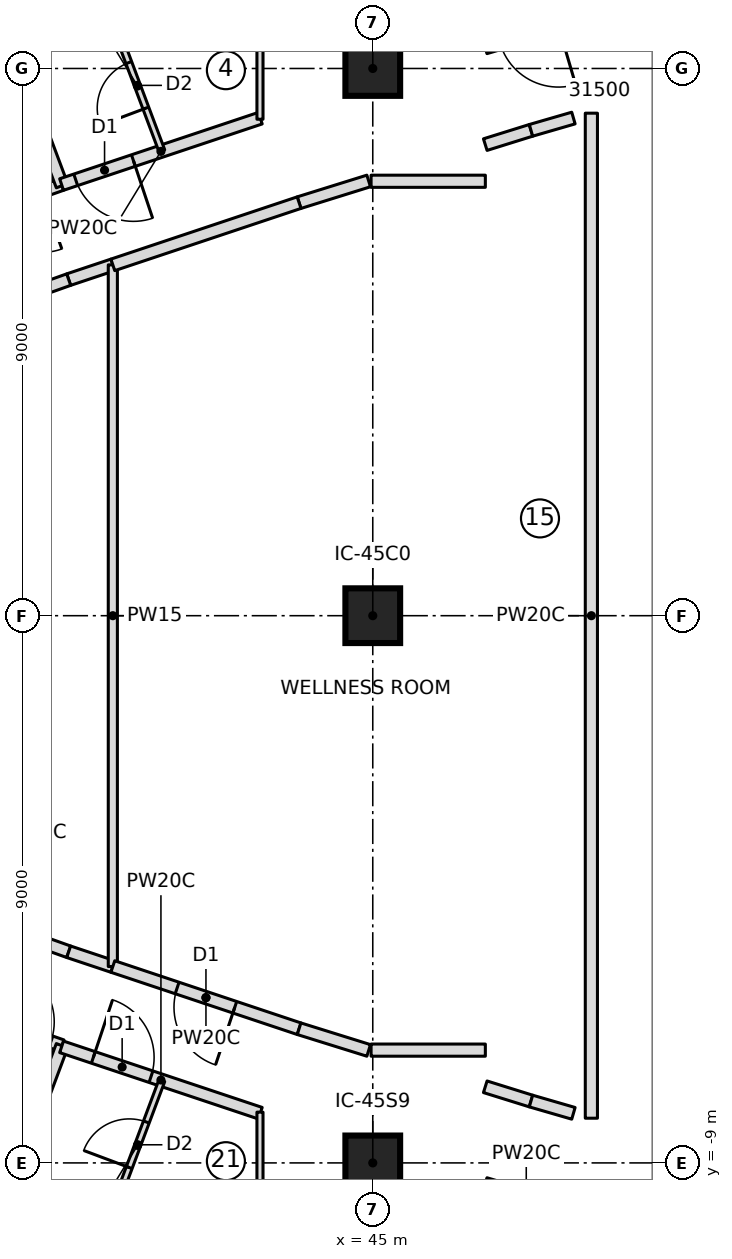
"""IFC4 building model, lengths in metres.
Left out: names, types, materials, properties, quantities, classifications, styles, units other than length and angle.
Written with IfcOpenShell. Run it as: python <this file> out.ifc"""

import sys

from ifc_helpers import new_model, si_unit, direction, frame, frame_2d, origin, origin_2d, place, context, subcontext, project, spatial, rectangle, extrude, element, fill, save


model = new_model("IFC4")
c1 = context("Model", 3, precision=1e-05, world=origin(), true_north=direction((0.0, 1.0)))
c2 = subcontext(c1, "Body", "Model", "MODEL_VIEW")
j1 = project(units=[si_unit("LENGTHUNIT", "METRE"), si_unit("PLANEANGLEUNIT", "RADIAN")], contexts=[c1])
p1 = place(None, origin())
s1 = spatial("IfcSite", under=j1, at=p1, CompositionType="ELEMENT")
p2 = place(p1, origin())
s2 = spatial("IfcBuilding", under=s1, at=p2, CompositionType="ELEMENT")
p3 = place(p2, frame((0.0, 0.0, 252.75)))
s3 = spatial("IfcBuildingStorey", under=s2, at=p3, CompositionType="ELEMENT", Elevation=252.75)
for number, where, z_axis, x_axis in (
    (1, (45.0, -9.0, 0.0), (0.0, 0.0, 1.0), (1.0, 0.0, 0.0)),
    (2, (45.0, 0.0, 0.0), (0.0, 0.0, 1.0), (1.0, 0.0, 0.0)),
    (3, (45.0, 9.0, 0.0), (0.0, 0.0, 1.0), (1.0, 0.0, 0.0)),
):
    element("IfcColumn", number, at=place(p3, frame(where, z_axis=z_axis, x_axis=x_axis)), inside=s3, PredefinedType="COLUMN", context=c2, shape_type="SweptSolid", body=[
        extrude(rectangle(XDim=0.9, YDim=0.9, at=origin_2d()), origin(), (0.0, 0.0, 1.0), 3.55),
    ])
p4 = place(p3, frame((39.882, 7.091, 0.0), z_axis=(0.0, 0.0, 1.0), x_axis=(-0.942537055217, -0.334101630559, 0.0)))
e4 = element("IfcWall", 4, at=p4, inside=s3, PredefinedType="PARTITIONING", context=c2, shape_type="SweptSolid", body=[
    extrude(rectangle(XDim=4.244, YDim=0.2, at=frame_2d((2.122, 0.0))), origin(), (0.0, 0.0, 1.0), 3.15),
])
p5 = place(p4, frame((0.35, 0.0, 0.0)))
e5 = element("IfcOpeningElement", 5, at=p5, cuts=e4, PredefinedType="OPENING", context=c2, shape_type="SweptSolid", body=[
    extrude(rectangle(XDim=1.0, YDim=2.1, at=frame_2d((0.5, 1.05))), frame((0.0, 0.11, 0.0), z_axis=(0.0, -1.0, 0.0), x_axis=(1.0, 0.0, 0.0)), (0.0, 0.0, 1.0), 0.22),
])
p6 = place(p3, frame((39.889, 7.072, 0.0), z_axis=(0.0, 0.0, 1.0), x_axis=(-0.35112895446, 0.936327110224, 0.0)))
e6 = element("IfcWall", 6, at=p6, inside=s3, PredefinedType="PARTITIONING", context=c2, shape_type="SweptSolid", body=[
    extrude(rectangle(XDim=9.706, YDim=0.2, at=frame_2d((4.853, 0.0))), origin(), (0.0, 0.0, 1.0), 3.15),
])
p7 = place(p3, frame((43.15, 8.183, 0.0), z_axis=(0.0, 0.0, 1.0), x_axis=(-0.948477584784, -0.316844238013, 0.0)))
e7 = element("IfcWall", 7, at=p7, inside=s3, PredefinedType="PARTITIONING", context=c2, shape_type="SweptSolid", body=[
    extrude(rectangle(XDim=3.445, YDim=0.2, at=frame_2d((1.723, 0.0))), origin(), (0.0, 0.0, 1.0), 3.15),
])
p8 = place(p7, frame((2.2, 0.0, 0.0)))
e8 = element("IfcOpeningElement", 8, at=p8, cuts=e7, PredefinedType="OPENING", context=c2, shape_type="SweptSolid", body=[
    extrude(rectangle(XDim=1.0, YDim=2.1, at=frame_2d((0.5, 1.05))), frame((0.0, 0.11, 0.0), z_axis=(0.0, -1.0, 0.0), x_axis=(1.0, 0.0, 0.0)), (0.0, 0.0, 1.0), 0.22),
])
p9 = place(p3, frame((41.532, 7.645, 0.0), z_axis=(0.0, 0.0, 1.0), x_axis=(-0.351146927505, 0.936320370014, 0.0)))
e9 = element("IfcWall", 9, at=p9, inside=s3, PredefinedType="PARTITIONING", context=c2, shape_type="SweptSolid", body=[
    extrude(rectangle(XDim=2.278, YDim=0.1, at=frame_2d((1.139, 0.0))), origin(), (0.0, 0.0, 1.0), 3.15),
])
p10 = place(p9, frame((0.75, 0.0, 0.0)))
e10 = element("IfcOpeningElement", 10, at=p10, cuts=e9, PredefinedType="OPENING", context=c2, shape_type="SweptSolid", body=[
    extrude(rectangle(XDim=0.8, YDim=2.1, at=frame_2d((0.4, 1.05))), frame((0.0, 0.06, 0.0), z_axis=(0.0, -1.0, 0.0), x_axis=(1.0, 0.0, 0.0)), (0.0, 0.0, 1.0), 0.12),
])
p11 = place(p3, frame((35.882, -5.673, 0.0), z_axis=(0.0, 0.0, 1.0), x_axis=(0.944107376821, -0.329638075823, 0.0)))
e11 = element("IfcWall", 11, at=p11, inside=s3, PredefinedType="PARTITIONING", context=c2, shape_type="SweptSolid", body=[
    extrude(rectangle(XDim=4.245, YDim=0.2, at=frame_2d((2.122, 0.0))), origin(), (0.0, 0.0, 1.0), 3.15),
])
p12 = place(p11, frame((3.05, 0.0, 0.0)))
e12 = element("IfcOpeningElement", 12, at=p12, cuts=e11, PredefinedType="OPENING", context=c2, shape_type="SweptSolid", body=[
    extrude(rectangle(XDim=1.0, YDim=2.1, at=frame_2d((0.5, 1.05))), frame((0.0, 0.11, 0.0), z_axis=(0.0, -1.0, 0.0), x_axis=(1.0, 0.0, 0.0)), (0.0, 0.0, 1.0), 0.22),
])
p13 = place(p3, frame((36.481, -16.161, 0.0), z_axis=(0.0, 0.0, 1.0), x_axis=(0.35112895446, 0.936327110224, 0.0)))
e13 = element("IfcWall", 13, at=p13, inside=s3, PredefinedType="PARTITIONING", context=c2, shape_type="SweptSolid", body=[
    extrude(rectangle(XDim=9.706, YDim=0.2, at=frame_2d((4.853, 0.0))), origin(), (0.0, 0.0, 1.0), 3.15),
])
p14 = place(p3, frame((39.882, -7.091, 0.0), z_axis=(0.0, 0.0, 1.0), x_axis=(0.948477584784, -0.316844238013, 0.0)))
e14 = element("IfcWall", 14, at=p14, inside=s3, PredefinedType="PARTITIONING", context=c2, shape_type="SweptSolid", body=[
    extrude(rectangle(XDim=3.445, YDim=0.2, at=frame_2d((1.723, 0.0))), origin(), (0.0, 0.0, 1.0), 3.15),
])
p15 = place(p14, frame((0.55, 0.0, 0.0)))
e15 = element("IfcOpeningElement", 15, at=p15, cuts=e14, PredefinedType="OPENING", context=c2, shape_type="SweptSolid", body=[
    extrude(rectangle(XDim=1.0, YDim=2.1, at=frame_2d((0.5, 1.05))), frame((0.0, 0.11, 0.0), z_axis=(0.0, -1.0, 0.0), x_axis=(1.0, 0.0, 0.0)), (0.0, 0.0, 1.0), 0.22),
])
p16 = place(p3, frame((40.732, -9.779, 0.0), z_axis=(0.0, 0.0, 1.0), x_axis=(0.351146927505, 0.936320370014, 0.0)))
e16 = element("IfcWall", 16, at=p16, inside=s3, PredefinedType="PARTITIONING", context=c2, shape_type="SweptSolid", body=[
    extrude(rectangle(XDim=2.278, YDim=0.1, at=frame_2d((1.139, 0.0))), origin(), (0.0, 0.0, 1.0), 3.15),
])
p17 = place(p16, frame((0.75, 0.0, 0.0)))
e17 = element("IfcOpeningElement", 17, at=p17, cuts=e16, PredefinedType="OPENING", context=c2, shape_type="SweptSolid", body=[
    extrude(rectangle(XDim=0.8, YDim=2.1, at=frame_2d((0.4, 1.05))), frame((0.0, 0.06, 0.0), z_axis=(0.0, -1.0, 0.0), x_axis=(1.0, 0.0, 0.0)), (0.0, 0.0, 1.0), 0.12),
])
p18 = place(p3, frame((46.85, -9.34, 0.0), z_axis=(0.0, 0.0, 1.0), x_axis=(0.958866391875, -0.283857785753, 0.0)))
e18 = element("IfcWall", 18, at=p18, inside=s3, PredefinedType="PARTITIONING", context=c2, shape_type="SweptSolid", body=[
    extrude(rectangle(XDim=1.406, YDim=0.2, at=frame_2d((0.703, 0.0))), origin(), (0.0, 0.0, 1.0), 3.15),
])
p19 = place(p3, frame((39.999, -5.527, 0.0), z_axis=(0.0, 0.0, 1.0), x_axis=(-0.941909090846, 0.335867927288, 0.0)))
e19 = element("IfcWall", 19, at=p19, inside=s3, PredefinedType="PARTITIONING", context=c2, shape_type="SweptSolid", body=[
    extrude(rectangle(XDim=3.995, YDim=0.2, at=frame_2d((1.998, 0.0))), origin(), (0.0, 0.0, 1.0), 3.15),
])
p20 = place(p19, frame((1.498, 0.0, 0.0)))
e20 = element("IfcOpeningElement", 20, at=p20, cuts=e19, PredefinedType="OPENING", context=c2, shape_type="SweptSolid", body=[
    extrude(rectangle(XDim=1.0, YDim=2.1, at=frame_2d((0.5, 1.05))), frame((0.0, 0.11, 0.0), z_axis=(0.0, -1.0, 0.0), x_axis=(1.0, 0.0, 0.0)), (0.0, 0.0, 1.0), 0.22),
])
for number, where, z_axis, x_axis in (
    (21, (39.999, 5.527, 0.0), (0.0, 0.0, 1.0), (0.948, 0.317, 0.0)),
    (22, (40.725, -5.77, 0.0), (0.0, 0.0, 1.0), (-0.948, 0.317, 0.0)),
):
    element("IfcWall", number, at=place(p3, frame(where, z_axis=z_axis, x_axis=x_axis)), inside=s3, PredefinedType="PARTITIONING", context=c2, shape_type="SweptSolid", body=[
        extrude(rectangle(XDim=0.765, YDim=0.2, at=frame_2d((0.383, 0.0))), origin(), (0.0, 0.0, 1.0), 3.15),
    ])
p21 = place(p3, frame((36.236, 4.186, 0.0), z_axis=(0.0, 0.0, 1.0), x_axis=(0.941909090846, 0.335867927288, 0.0)))
e23 = element("IfcWall", 23, at=p21, inside=s3, PredefinedType="PARTITIONING", context=c2, shape_type="SweptSolid", body=[
    extrude(rectangle(XDim=3.995, YDim=0.2, at=frame_2d((1.998, 0.0))), origin(), (0.0, 0.0, 1.0), 3.15),
])
p22 = place(p3, frame((40.725, -5.77, 0.0), z_axis=(0.0, 0.0, 1.0), x_axis=(0.0, 1.0, 0.0)))
e24 = element("IfcWall", 24, at=p22, inside=s3, PredefinedType="PARTITIONING", context=c2, shape_type="SweptSolid", body=[
    extrude(rectangle(XDim=11.54, YDim=0.15, at=frame_2d((5.77, 0.0))), origin(), (0.0, 0.0, 1.0), 3.15),
])
p23 = place(p3, frame((43.788, -6.793, 0.0), z_axis=(0.0, 0.0, 1.0), x_axis=(-0.948486568618, 0.316817343515, 0.0)))
e25 = element("IfcWall", 25, at=p23, inside=s3, PredefinedType="PARTITIONING", context=c2, shape_type="SweptSolid", body=[
    extrude(rectangle(XDim=3.229, YDim=0.2, at=frame_2d((1.615, 0.0))), origin(), (0.0, 0.0, 1.0), 3.15),
])
p24 = place(p23, frame((1.115, 0.0, 0.0)))
e26 = element("IfcOpeningElement", 26, at=p24, cuts=e25, PredefinedType="OPENING", context=c2, shape_type="SweptSolid", body=[
    extrude(rectangle(XDim=1.0, YDim=2.1, at=frame_2d((0.5, 1.05))), frame((0.0, 0.11, 0.0), z_axis=(0.0, -1.0, 0.0), x_axis=(1.0, 0.0, 0.0)), (0.0, 0.0, 1.0), 0.22),
])
p25 = place(p3, frame((43.788, 6.793, 0.0), z_axis=(0.0, 0.0, 1.0), x_axis=(0.954693570678, 0.29759063511, 0.0)))
e27 = element("IfcWall", 27, at=p25, inside=s3, PredefinedType="PARTITIONING", context=c2, shape_type="SweptSolid", body=[
    extrude(rectangle(XDim=1.198, YDim=0.2, at=frame_2d((0.599, 0.0))), origin(), (0.0, 0.0, 1.0), 3.15),
])
for number, where, z_axis, x_axis in (
    (28, (46.85, 7.748, 0.0), (0.0, 0.0, 1.0), (0.955, 0.298, 0.0)),
    (29, (47.602, -7.982, 0.0), (0.0, 0.0, 1.0), (-0.955, 0.298, 0.0)),
):
    element("IfcWall", number, at=place(p3, frame(where, z_axis=z_axis, x_axis=x_axis)), inside=s3, PredefinedType="PARTITIONING", context=c2, shape_type="SweptSolid", body=[
        extrude(rectangle(XDim=0.788, YDim=0.2, at=frame_2d((0.394, 0.0))), origin(), (0.0, 0.0, 1.0), 3.15),
    ])
p26 = place(p3, frame((44.933, -7.15, 0.0), z_axis=(0.0, 0.0, 1.0), x_axis=(-0.954693570678, 0.29759063511, 0.0)))
e30 = element("IfcWall", 30, at=p26, inside=s3, PredefinedType="PARTITIONING", context=c2, shape_type="SweptSolid", body=[
    extrude(rectangle(XDim=1.198, YDim=0.2, at=frame_2d((0.599, 0.0))), origin(), (0.0, 0.0, 1.0), 3.15),
])
p27 = place(p3, frame((40.725, 5.77, 0.0), z_axis=(0.0, 0.0, 1.0), x_axis=(0.948486568618, 0.316817343515, 0.0)))
e31 = element("IfcWall", 31, at=p27, inside=s3, PredefinedType="PARTITIONING", context=c2, shape_type="SweptSolid", body=[
    extrude(rectangle(XDim=3.229, YDim=0.2, at=frame_2d((1.615, 0.0))), origin(), (0.0, 0.0, 1.0), 3.15),
])
for number, where, z_axis, x_axis in (
    (32, (43.145, 10.463, 0.0), (0.0, 0.0, 1.0), (0.0, -1.0, 0.0)),
    (33, (43.145, -8.165, 0.0), (0.0, 0.0, 1.0), (0.0, -1.0, 0.0)),
):
    element("IfcWall", number, at=place(p3, frame(where, z_axis=z_axis, x_axis=x_axis)), inside=s3, PredefinedType="PARTITIONING", context=c2, shape_type="SweptSolid", body=[
        extrude(rectangle(XDim=2.298, YDim=0.1, at=frame_2d((1.149, 0.0))), origin(), (0.0, 0.0, 1.0), 3.15),
    ])
p28 = place(p3, frame((48.3, 9.766, 0.0), z_axis=(0.0, 0.0, 1.0), x_axis=(-0.95944263903, -0.281903924079, 0.0)))
e34 = element("IfcWall", 34, at=p28, inside=s3, PredefinedType="PARTITIONING", context=c2, shape_type="SweptSolid", body=[
    extrude(rectangle(XDim=1.511, YDim=0.2, at=frame_2d((0.756, 0.0))), origin(), (0.0, 0.0, 1.0), 3.15),
])
p29 = place(p28, frame((0.256, 0.0, 0.0)))
e35 = element("IfcOpeningElement", 35, at=p29, cuts=e34, PredefinedType="OPENING", context=c2, shape_type="SweptSolid", body=[
    extrude(rectangle(XDim=1.0, YDim=2.1, at=frame_2d((0.5, 1.05))), frame((0.0, 0.11, 0.0), z_axis=(0.0, -1.0, 0.0), x_axis=(1.0, 0.0, 0.0)), (0.0, 0.0, 1.0), 0.22),
])
for number, where, z_axis, x_axis in (
    (36, (47.602, 7.982, 0.0), (0.0, 0.0, 1.0), (0.96, 0.278, 0.0)),
    (37, (48.3, -8.185, 0.0), (0.0, 0.0, 1.0), (-0.96, 0.278, 0.0)),
):
    element("IfcWall", number, at=place(p3, frame(where, z_axis=z_axis, x_axis=x_axis)), inside=s3, PredefinedType="PARTITIONING", context=c2, shape_type="SweptSolid", body=[
        extrude(rectangle(XDim=0.727, YDim=0.2, at=frame_2d((0.363, 0.0))), origin(), (0.0, 0.0, 1.0), 3.15),
    ])
p30 = place(p3, frame((44.972, 7.145, 0.0), z_axis=(0.0, 0.0, 1.0), x_axis=(0.99999999156, 0.000129920747, 0.0)))
e38 = element("IfcWall", 38, at=p30, inside=s3, PredefinedType="PARTITIONING", context=c2, shape_type="SweptSolid", body=[
    extrude(rectangle(XDim=1.879, YDim=0.2, at=frame_2d((0.939, 0.0))), origin(), (0.0, 0.0, 1.0), 3.15),
])
p31 = place(p3, frame((48.595, 8.265, 0.0), z_axis=(0.0, 0.0, 1.0), x_axis=(0.0, -1.0, 0.0)))
e39 = element("IfcWall", 39, at=p31, inside=s3, PredefinedType="PARTITIONING", context=c2, shape_type="SweptSolid", body=[
    extrude(rectangle(XDim=16.53, YDim=0.2, at=frame_2d((8.265, 0.0))), origin(), (0.0, 0.0, 1.0), 3.15),
])
p32 = place(p3, frame((46.852, -7.145, 0.0), z_axis=(0.0, 0.0, 1.0), x_axis=(-0.99999999156, 0.000129920747, 0.0)))
e40 = element("IfcWall", 40, at=p32, inside=s3, PredefinedType="PARTITIONING", context=c2, shape_type="SweptSolid", body=[
    extrude(rectangle(XDim=1.879, YDim=0.2, at=frame_2d((0.939, 0.0))), origin(), (0.0, 0.0, 1.0), 3.15),
])
p33 = place(p10, origin())
e41 = element("IfcDoor", 41, at=p33, inside=s3, OperationType="SINGLE_SWING_LEFT", PredefinedType="DOOR", context=c2, shape_type="SweptSolid", body=[
    extrude(rectangle(XDim=0.8, YDim=2.1, at=frame_2d((0.4, 1.05))), frame((0.0, 0.025, 0.0), z_axis=(0.0, -1.0, 0.0), x_axis=(1.0, 0.0, 0.0)), (0.0, 0.0, 1.0), 0.05),
])
fill(e10, e41)
p34 = place(p8, origin())
e42 = element("IfcDoor", 42, at=p34, inside=s3, OperationType="SINGLE_SWING_LEFT", PredefinedType="DOOR", context=c2, shape_type="SweptSolid", body=[
    extrude(rectangle(XDim=1.0, YDim=2.1, at=frame_2d((0.5, 1.05))), frame((0.0, 0.025, 0.0), z_axis=(0.0, -1.0, 0.0), x_axis=(1.0, 0.0, 0.0)), (0.0, 0.0, 1.0), 0.05),
])
fill(e8, e42)
p35 = place(p17, origin())
e43 = element("IfcDoor", 43, at=p35, inside=s3, OperationType="SINGLE_SWING_LEFT", PredefinedType="DOOR", context=c2, shape_type="SweptSolid", body=[
    extrude(rectangle(XDim=0.8, YDim=2.1, at=frame_2d((0.4, 1.05))), frame((0.0, 0.025, 0.0), z_axis=(0.0, -1.0, 0.0), x_axis=(1.0, 0.0, 0.0)), (0.0, 0.0, 1.0), 0.05),
])
fill(e17, e43)
p36 = place(p15, origin())
e44 = element("IfcDoor", 44, at=p36, inside=s3, OperationType="SINGLE_SWING_LEFT", PredefinedType="DOOR", context=c2, shape_type="SweptSolid", body=[
    extrude(rectangle(XDim=1.0, YDim=2.1, at=frame_2d((0.5, 1.05))), frame((0.0, 0.025, 0.0), z_axis=(0.0, -1.0, 0.0), x_axis=(1.0, 0.0, 0.0)), (0.0, 0.0, 1.0), 0.05),
])
fill(e15, e44)
p37 = place(p24, origin())
e45 = element("IfcDoor", 45, at=p37, inside=s3, OperationType="SINGLE_SWING_LEFT", PredefinedType="DOOR", context=c2, shape_type="SweptSolid", body=[
    extrude(rectangle(XDim=1.0, YDim=2.1, at=frame_2d((0.5, 1.05))), frame((0.0, 0.025, 0.0), z_axis=(0.0, -1.0, 0.0), x_axis=(1.0, 0.0, 0.0)), (0.0, 0.0, 1.0), 0.05),
])
fill(e26, e45)
save(model, sys.argv[1])
